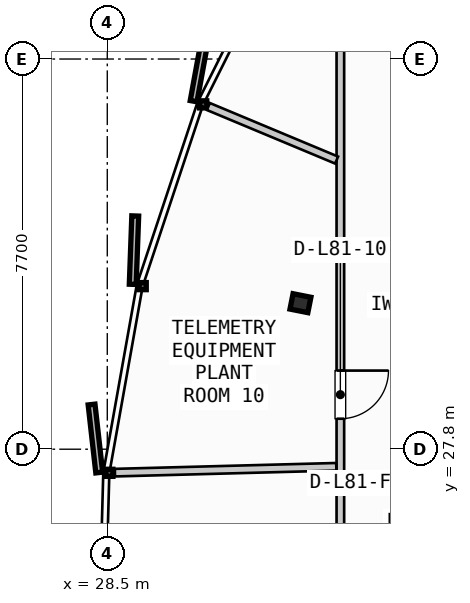
"""IFC4 building model, lengths in metres.
Left out: names, types, materials, properties, quantities, classifications, styles, units other than length and angle.
Written with IfcOpenShell. Run it as: python <this file> out.ifc"""

import sys

from ifc_helpers import new_model, si_unit, direction, frame, frame_2d, origin, origin_2d, place, context, subcontext, project, spatial, rectangle, i_section, extrude, source, transform, mapped, element, fill, save


model = new_model("IFC4")
c1 = context("Model", 3, precision=1e-05, world=origin(), true_north=direction((0.0, 1.0)))
c2 = subcontext(c1, "Body", "Model", "MODEL_VIEW")
j1 = project(units=[si_unit("LENGTHUNIT", "METRE"), si_unit("PLANEANGLEUNIT", "RADIAN")], contexts=[c1])
p1 = place(None, origin())
s1 = spatial("IfcSite", under=j1, at=p1, CompositionType="ELEMENT")
p2 = place(p1, origin())
s2 = spatial("IfcBuilding", under=s1, at=p2, CompositionType="ELEMENT")
p3 = place(p2, frame((0.0, 0.0, 304.3)))
s3 = spatial("IfcBuildingStorey", under=s2, at=p3, CompositionType="ELEMENT", Elevation=304.3)
m1 = source(origin(), c2, "Body", "SweptSolid", [
    extrude(i_section(OverallWidth=0.309, OverallDepth=0.359, WebThickness=0.016, FlangeThickness=0.026, FilletRadius=0.027, at=origin_2d()), origin(), (0.0, 0.0, 1.0), 3.735),
])
p4 = place(p3, frame((32.312, 30.682, 0.0), z_axis=(0.0, 0.0, 1.0), x_axis=(-0.980785280403, 0.195090322016, 0.0)))
e1 = element("IfcColumn", 1, at=p4, inside=s3, PredefinedType="COLUMN", context=c2, shape_type="MappedRepresentation", body=[
    mapped(m1, transform((0.0, 0.0, 0.0), scale=1.0)),
])
p5 = place(p3, frame((33.1, 37.2, 0.0), z_axis=(0.0, 0.0, 1.0), x_axis=(0.0, -1.0, 0.0)))
e2 = element("IfcWall", 2, at=p5, inside=s3, PredefinedType="PARTITIONING", context=c2, shape_type="SweptSolid", body=[
    extrude(rectangle(XDim=18.8, YDim=0.15, at=frame_2d((9.4, 0.0))), origin(), (0.0, 0.0, 1.0), 3.26),
])
p6 = place(p5, frame((13.507, 0.0, 0.0)))
e3 = element("IfcOpeningElement", 3, at=p6, cuts=e2, PredefinedType="OPENING", context=c2, shape_type="SweptSolid", body=[
    extrude(rectangle(XDim=0.95, YDim=2.15, at=frame_2d((0.475, 1.075))), frame((0.0, 0.085, 0.0), z_axis=(0.0, -1.0, 0.0), x_axis=(1.0, 0.0, 0.0)), (0.0, 0.0, 1.0), 0.17),
])
p7 = place(p5, frame((7.848, 0.0, 0.0)))
e4 = element("IfcOpeningElement", 4, at=p7, cuts=e2, PredefinedType="OPENING", context=c2, shape_type="SweptSolid", body=[
    extrude(rectangle(XDim=0.95, YDim=2.15, at=frame_2d((0.475, 1.075))), frame((0.0, 0.085, 0.0), z_axis=(0.0, -1.0, 0.0), x_axis=(1.0, 0.0, 0.0)), (0.0, 0.0, 1.0), 0.17),
])
p8 = place(p3, frame((33.02, 27.453, 0.0), z_axis=(0.0, 0.0, 1.0), x_axis=(-0.999647940646, -0.026532899632, 0.0)))
e5 = element("IfcWall", 5, at=p8, inside=s3, PredefinedType="PARTITIONING", context=c2, shape_type="SweptSolid", body=[
    extrude(rectangle(XDim=4.371, YDim=0.15, at=frame_2d((2.185, 0.0))), origin(), (0.0, 0.0, 1.0), 3.26),
])
p9 = place(p3, frame((33.026, 33.506, 0.0), z_axis=(0.0, 0.0, 1.0), x_axis=(-0.922747412887, 0.385405256854, 0.0)))
e6 = element("IfcWall", 6, at=p9, inside=s3, PredefinedType="PARTITIONING", context=c2, shape_type="SweptSolid", body=[
    extrude(rectangle(XDim=2.743, YDim=0.15, at=frame_2d((1.372, 0.0))), origin(), (0.0, 0.0, 1.0), 3.26),
])
m2 = source(origin(), c2, "Body", "SweptSolid", [
    extrude(rectangle(XDim=0.95, YDim=2.15, at=frame_2d((0.475, 1.075))), frame((0.0, 0.025, 0.0), z_axis=(0.0, -1.0, 0.0), x_axis=(1.0, 0.0, 0.0)), (0.0, 0.0, 1.0), 0.05),
])
p10 = place(p7, origin())
e7 = element("IfcDoor", 7, at=p10, inside=s3, OperationType="SINGLE_SWING_LEFT", PredefinedType="DOOR", context=c2, shape_type="MappedRepresentation", body=[
    mapped(m2, transform((0.0, 0.0, 0.0), scale=1.0)),
])
fill(e4, e7)
save(model, sys.argv[1])
